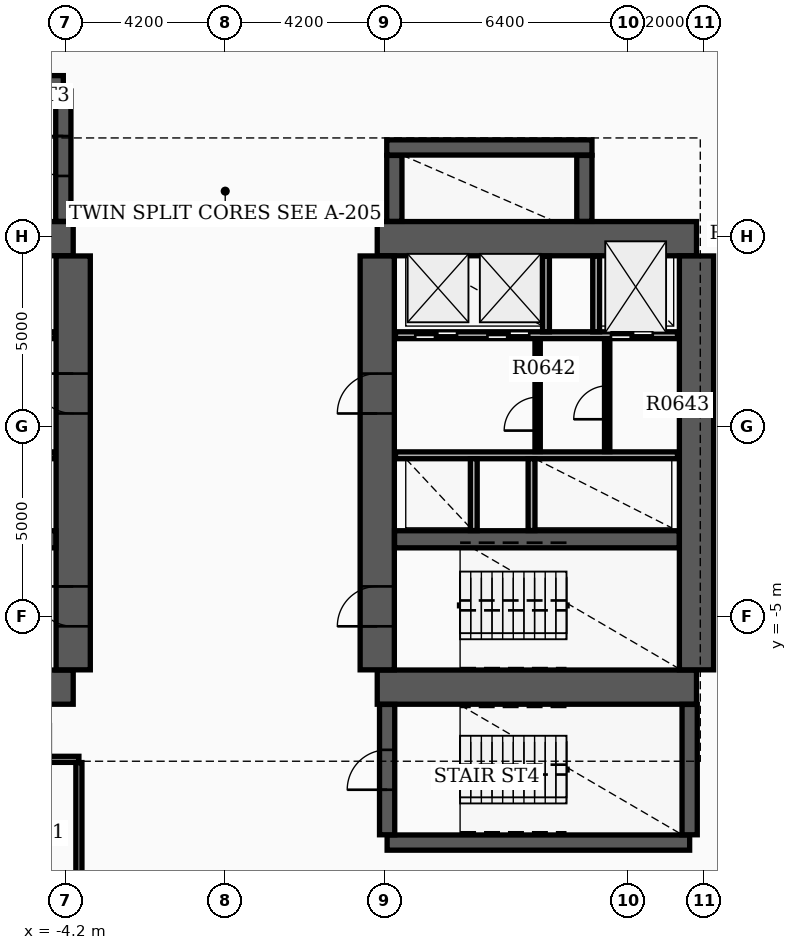
"""IFC4 building model, lengths in metres.
Left out: names, types, materials, properties, quantities, classifications, styles, units other than length and angle.
Written with IfcOpenShell. Run it as: python <this file> out.ifc"""

import sys

from ifc_helpers import new_model, si_unit, direction, frame, frame_2d, origin, place, context, subcontext, project, spatial, rectangle, extrude, element, fill, save


model = new_model("IFC4")
c1 = context("Model", 3, precision=1e-05, world=origin(), true_north=direction((0.0, 1.0)))
c2 = subcontext(c1, "Body", "Model", "MODEL_VIEW")
j1 = project(units=[si_unit("LENGTHUNIT", "METRE"), si_unit("PLANEANGLEUNIT", "RADIAN")], contexts=[c1])
p1 = place(None, origin())
s1 = spatial("IfcSite", under=j1, at=p1, CompositionType="ELEMENT")
p2 = place(p1, origin())
s2 = spatial("IfcBuilding", under=s1, at=p2, CompositionType="ELEMENT")
p3 = place(p2, frame((0.0, 0.0, 43.2)))
s3 = spatial("IfcBuildingStorey", under=s2, at=p3, CompositionType="ELEMENT", Elevation=43.2)
for number, where, z_axis, x_axis in (
    (1, (-12.4, -6.85, 0.0), (0.0, 0.0, 1.0), (1.0, 0.0, 0.0)),
    (2, (-12.4, 4.95, 0.0), (0.0, 0.0, 1.0), (1.0, 0.0, 0.0)),
):
    element("IfcWall", number, at=place(p3, frame(where, z_axis=z_axis, x_axis=x_axis)), inside=s3, PredefinedType="SHEAR", context=c2, shape_type="SweptSolid", body=[
        extrude(rectangle(XDim=8.4, YDim=0.9, at=frame_2d((4.2, 0.0))), origin(), (0.0, 0.0, 1.0), 3.65),
    ])
p4 = place(p3, frame((-4.0, -6.395, 0.0), z_axis=(0.0, 0.0, 1.0), x_axis=(0.0, 1.0, 0.0)))
e3 = element("IfcWall", 3, at=p4, inside=s3, PredefinedType="SHEAR", context=c2, shape_type="SweptSolid", body=[
    extrude(rectangle(XDim=10.89, YDim=0.9, at=frame_2d((5.445, 0.0))), origin(), (0.0, 0.0, 1.0), 3.65),
])
p5 = place(p4, frame((1.145, 0.0, 0.0)))
e4 = element("IfcOpeningElement", 4, at=p5, cuts=e3, PredefinedType="OPENING", context=c2, shape_type="SweptSolid", body=[
    extrude(rectangle(XDim=1.05, YDim=2.15, at=frame_2d((0.525, 1.075))), frame((0.0, 0.46, 0.0), z_axis=(0.0, -1.0, 0.0), x_axis=(1.0, 0.0, 0.0)), (0.0, 0.0, 1.0), 0.92),
])
p6 = place(p4, frame((6.745, 0.0, 0.0)))
e5 = element("IfcOpeningElement", 5, at=p6, cuts=e3, PredefinedType="OPENING", context=c2, shape_type="SweptSolid", body=[
    extrude(rectangle(XDim=1.05, YDim=2.15, at=frame_2d((0.525, 1.075))), frame((0.0, 0.46, 0.0), z_axis=(0.0, -1.0, 0.0), x_axis=(1.0, 0.0, 0.0)), (0.0, 0.0, 1.0), 0.92),
])
p7 = place(p3, frame((-11.945, -2.96, 0.0), z_axis=(0.0, 0.0, 1.0), x_axis=(1.0, 0.0, 0.0)))
e6 = element("IfcWall", 6, at=p7, inside=s3, PredefinedType="SHEAR", context=c2, shape_type="SweptSolid", body=[
    extrude(rectangle(XDim=7.49, YDim=0.45, at=frame_2d((3.745, 0.0))), origin(), (0.0, 0.0, 1.0), 3.65),
])
for number, where, z_axis, x_axis in (
    (7, (4.0, -6.85, 0.0), (0.0, 0.0, 1.0), (1.0, 0.0, 0.0)),
    (8, (4.0, 4.95, 0.0), (0.0, 0.0, 1.0), (1.0, 0.0, 0.0)),
):
    element("IfcWall", number, at=place(p3, frame(where, z_axis=z_axis, x_axis=x_axis)), inside=s3, PredefinedType="SHEAR", context=c2, shape_type="SweptSolid", body=[
        extrude(rectangle(XDim=8.4, YDim=0.9, at=frame_2d((4.2, 0.0))), origin(), (0.0, 0.0, 1.0), 3.65),
    ])
p8 = place(p3, frame((4.0, -6.395, 0.0), z_axis=(0.0, 0.0, 1.0), x_axis=(0.0, 1.0, 0.0)))
e9 = element("IfcWall", 9, at=p8, inside=s3, PredefinedType="SHEAR", context=c2, shape_type="SweptSolid", body=[
    extrude(rectangle(XDim=10.89, YDim=0.9, at=frame_2d((5.445, 0.0))), origin(), (0.0, 0.0, 1.0), 3.65),
])
p9 = place(p8, frame((1.145, 0.0, 0.0)))
e10 = element("IfcOpeningElement", 10, at=p9, cuts=e9, PredefinedType="OPENING", context=c2, shape_type="SweptSolid", body=[
    extrude(rectangle(XDim=1.05, YDim=2.15, at=frame_2d((0.525, 1.075))), frame((0.0, 0.46, 0.0), z_axis=(0.0, -1.0, 0.0), x_axis=(1.0, 0.0, 0.0)), (0.0, 0.0, 1.0), 0.92),
])
p10 = place(p8, frame((6.745, 0.0, 0.0)))
e11 = element("IfcOpeningElement", 11, at=p10, cuts=e9, PredefinedType="OPENING", context=c2, shape_type="SweptSolid", body=[
    extrude(rectangle(XDim=1.05, YDim=2.15, at=frame_2d((0.525, 1.075))), frame((0.0, 0.46, 0.0), z_axis=(0.0, -1.0, 0.0), x_axis=(1.0, 0.0, 0.0)), (0.0, 0.0, 1.0), 0.92),
])
p11 = place(p3, frame((12.4, -6.395, 0.0), z_axis=(0.0, 0.0, 1.0), x_axis=(0.0, 1.0, 0.0)))
e12 = element("IfcWall", 12, at=p11, inside=s3, PredefinedType="SHEAR", context=c2, shape_type="SweptSolid", body=[
    extrude(rectangle(XDim=10.89, YDim=0.9, at=frame_2d((5.445, 0.0))), origin(), (0.0, 0.0, 1.0), 3.65),
])
p12 = place(p3, frame((4.455, -2.96, 0.0), z_axis=(0.0, 0.0, 1.0), x_axis=(1.0, 0.0, 0.0)))
e13 = element("IfcWall", 13, at=p12, inside=s3, PredefinedType="SHEAR", context=c2, shape_type="SweptSolid", body=[
    extrude(rectangle(XDim=7.49, YDim=0.45, at=frame_2d((3.745, 0.0))), origin(), (0.0, 0.0, 1.0), 3.65),
])
p13 = place(p3, frame((-12.22, 9.04, 0.0), z_axis=(0.0, 0.0, 1.0), x_axis=(1.0, 0.0, 0.0)))
e14 = element("IfcWall", 14, at=p13, inside=s3, PredefinedType="SHEAR", context=c2, shape_type="SweptSolid", body=[
    extrude(rectangle(XDim=7.96, YDim=0.4, at=frame_2d((3.98, 0.0))), origin(), (0.0, 0.0, 1.0), 3.65),
])
p14 = place(p3, frame((-4.26, 5.405, 0.0), z_axis=(0.0, 0.0, 1.0), x_axis=(0.0, 1.0, 0.0)))
e15 = element("IfcWall", 15, at=p14, inside=s3, PredefinedType="SHEAR", context=c2, shape_type="SweptSolid", body=[
    extrude(rectangle(XDim=3.43, YDim=0.4, at=frame_2d((1.715, 0.0))), origin(), (0.0, 0.0, 1.0), 3.65),
])
p15 = place(p14, frame((1.195, 0.0, 0.0)))
e16 = element("IfcOpeningElement", 16, at=p15, cuts=e15, PredefinedType="OPENING", context=c2, shape_type="SweptSolid", body=[
    extrude(rectangle(XDim=1.05, YDim=2.15, at=frame_2d((0.525, 1.075))), frame((0.0, 0.21, 0.0), z_axis=(0.0, -1.0, 0.0), x_axis=(1.0, 0.0, 0.0)), (0.0, 0.0, 1.0), 0.42),
])
p16 = place(p3, frame((4.26, -10.94, 0.0), z_axis=(0.0, 0.0, 1.0), x_axis=(1.0, 0.0, 0.0)))
e17 = element("IfcWall", 17, at=p16, inside=s3, PredefinedType="SHEAR", context=c2, shape_type="SweptSolid", body=[
    extrude(rectangle(XDim=7.96, YDim=0.4, at=frame_2d((3.98, 0.0))), origin(), (0.0, 0.0, 1.0), 3.65),
])
p17 = place(p3, frame((4.26, -10.735, 0.0), z_axis=(0.0, 0.0, 1.0), x_axis=(0.0, 1.0, 0.0)))
e18 = element("IfcWall", 18, at=p17, inside=s3, PredefinedType="SHEAR", context=c2, shape_type="SweptSolid", body=[
    extrude(rectangle(XDim=3.43, YDim=0.4, at=frame_2d((1.715, 0.0))), origin(), (0.0, 0.0, 1.0), 3.65),
])
p18 = place(p17, frame((1.185, 0.0, 0.0)))
e19 = element("IfcOpeningElement", 19, at=p18, cuts=e18, PredefinedType="OPENING", context=c2, shape_type="SweptSolid", body=[
    extrude(rectangle(XDim=1.05, YDim=2.15, at=frame_2d((0.525, 1.075))), frame((0.0, 0.21, 0.0), z_axis=(0.0, -1.0, 0.0), x_axis=(1.0, 0.0, 0.0)), (0.0, 0.0, 1.0), 0.42),
])
p19 = place(p3, frame((12.22, -10.735, 0.0), z_axis=(0.0, 0.0, 1.0), x_axis=(0.0, 1.0, 0.0)))
e20 = element("IfcWall", 20, at=p19, inside=s3, PredefinedType="SHEAR", context=c2, shape_type="SweptSolid", body=[
    extrude(rectangle(XDim=3.43, YDim=0.4, at=frame_2d((1.715, 0.0))), origin(), (0.0, 0.0, 1.0), 3.65),
])
p20 = place(p3, frame((4.45, 5.405, 0.0), z_axis=(0.0, 0.0, 1.0), x_axis=(0.0, 1.0, 0.0)))
e21 = element("IfcWall", 21, at=p20, inside=s3, PredefinedType="SHEAR", context=c2, shape_type="SweptSolid", body=[
    extrude(rectangle(XDim=1.735, YDim=0.4, at=frame_2d((0.867, 0.0))), origin(), (0.0, 0.0, 1.0), 3.65),
])
p21 = place(p3, frame((4.25, 7.35, 0.0), z_axis=(0.0, 0.0, 1.0), x_axis=(1.0, 0.0, 0.0)))
e22 = element("IfcWall", 22, at=p21, inside=s3, PredefinedType="SHEAR", context=c2, shape_type="SweptSolid", body=[
    extrude(rectangle(XDim=5.4, YDim=0.4, at=frame_2d((2.7, 0.0))), origin(), (0.0, 0.0, 1.0), 3.65),
])
p22 = place(p3, frame((9.45, 5.405, 0.0), z_axis=(0.0, 0.0, 1.0), x_axis=(0.0, 1.0, 0.0)))
e23 = element("IfcWall", 23, at=p22, inside=s3, PredefinedType="SHEAR", context=c2, shape_type="SweptSolid", body=[
    extrude(rectangle(XDim=1.735, YDim=0.4, at=frame_2d((0.867, 0.0))), origin(), (0.0, 0.0, 1.0), 3.65),
])
p23 = place(p3, frame((-11.9, 2.41, 0.0), z_axis=(0.0, 0.0, 1.0), x_axis=(1.0, 0.0, 0.0)))
e24 = element("IfcWall", 24, at=p23, inside=s3, PredefinedType="SOLIDWALL", context=c2, shape_type="SweptSolid", body=[
    extrude(rectangle(XDim=7.42, YDim=0.18, at=frame_2d((3.71, 0.0))), origin(), (0.0, 0.0, 1.0), 2.85),
])
p24 = place(p23, frame((0.55, 0.0, 0.0)))
e25 = element("IfcOpeningElement", 25, at=p24, cuts=e24, PredefinedType="OPENING", context=c2, shape_type="SweptSolid", body=[
    extrude(rectangle(XDim=1.1, YDim=2.15, at=frame_2d((0.55, 1.075))), frame((0.0, 0.1, 0.0), z_axis=(0.0, -1.0, 0.0), x_axis=(1.0, 0.0, 0.0)), (0.0, 0.0, 1.0), 0.2),
])
p25 = place(p23, frame((3.85, 0.0, 0.0)))
e26 = element("IfcOpeningElement", 26, at=p25, cuts=e24, PredefinedType="OPENING", context=c2, shape_type="SweptSolid", body=[
    extrude(rectangle(XDim=1.1, YDim=2.15, at=frame_2d((0.55, 1.075))), frame((0.0, 0.1, 0.0), z_axis=(0.0, -1.0, 0.0), x_axis=(1.0, 0.0, 0.0)), (0.0, 0.0, 1.0), 0.2),
])
p26 = place(p23, frame((5.75, 0.0, 0.0)))
e27 = element("IfcOpeningElement", 27, at=p26, cuts=e24, PredefinedType="OPENING", context=c2, shape_type="SweptSolid", body=[
    extrude(rectangle(XDim=1.1, YDim=2.15, at=frame_2d((0.55, 1.075))), frame((0.0, 0.1, 0.0), z_axis=(0.0, -1.0, 0.0), x_axis=(1.0, 0.0, 0.0)), (0.0, 0.0, 1.0), 0.2),
])
p27 = place(p3, frame((4.48, 2.41, 0.0), z_axis=(0.0, 0.0, 1.0), x_axis=(1.0, 0.0, 0.0)))
e28 = element("IfcWall", 28, at=p27, inside=s3, PredefinedType="SOLIDWALL", context=c2, shape_type="SweptSolid", body=[
    extrude(rectangle(XDim=7.42, YDim=0.18, at=frame_2d((3.71, 0.0))), origin(), (0.0, 0.0, 1.0), 2.85),
])
p28 = place(p27, frame((5.67, 0.0, 0.0)))
e29 = element("IfcOpeningElement", 29, at=p28, cuts=e28, PredefinedType="OPENING", context=c2, shape_type="SweptSolid", body=[
    extrude(rectangle(XDim=1.1, YDim=2.15, at=frame_2d((0.55, 1.075))), frame((0.0, 0.1, 0.0), z_axis=(0.0, -1.0, 0.0), x_axis=(1.0, 0.0, 0.0)), (0.0, 0.0, 1.0), 0.2),
])
p29 = place(p27, frame((0.52, 0.0, 0.0)))
e30 = element("IfcOpeningElement", 30, at=p29, cuts=e28, PredefinedType="OPENING", context=c2, shape_type="SweptSolid", body=[
    extrude(rectangle(XDim=1.1, YDim=2.15, at=frame_2d((0.55, 1.075))), frame((0.0, 0.1, 0.0), z_axis=(0.0, -1.0, 0.0), x_axis=(1.0, 0.0, 0.0)), (0.0, 0.0, 1.0), 0.2),
])
p30 = place(p27, frame((2.42, 0.0, 0.0)))
e31 = element("IfcOpeningElement", 31, at=p30, cuts=e28, PredefinedType="OPENING", context=c2, shape_type="SweptSolid", body=[
    extrude(rectangle(XDim=1.1, YDim=2.15, at=frame_2d((0.55, 1.075))), frame((0.0, 0.1, 0.0), z_axis=(0.0, -1.0, 0.0), x_axis=(1.0, 0.0, 0.0)), (0.0, 0.0, 1.0), 0.2),
])
for number, where, z_axis, x_axis in (
    (32, (-11.9, -0.75, 0.0), (0.0, 0.0, 1.0), (1.0, 0.0, 0.0)),
    (33, (4.48, -0.75, 0.0), (0.0, 0.0, 1.0), (1.0, 0.0, 0.0)),
):
    element("IfcWall", number, at=place(p3, frame(where, z_axis=z_axis, x_axis=x_axis)), inside=s3, PredefinedType="SOLIDWALL", context=c2, shape_type="SweptSolid", body=[
        extrude(rectangle(XDim=7.42, YDim=0.18, at=frame_2d((3.71, 0.0))), origin(), (0.0, 0.0, 1.0), 2.85),
    ])
for number, where, z_axis, x_axis in (
    (34, (8.44, 2.5, 0.0), (0.0, 0.0, 1.0), (0.0, 1.0, 0.0)),
    (35, (9.76, 2.5, 0.0), (0.0, 0.0, 1.0), (0.0, 1.0, 0.0)),
):
    element("IfcWall", number, at=place(p3, frame(where, z_axis=z_axis, x_axis=x_axis)), inside=s3, PredefinedType="SOLIDWALL", context=c2, shape_type="SweptSolid", body=[
        extrude(rectangle(XDim=1.99, YDim=0.18, at=frame_2d((0.995, 0.0))), origin(), (0.0, 0.0, 1.0), 2.85),
    ])
for number, where, z_axis, x_axis in (
    (36, (6.54, -2.73, 0.0), (0.0, 0.0, 1.0), (0.0, 1.0, 0.0)),
    (37, (8.06, -2.73, 0.0), (0.0, 0.0, 1.0), (0.0, 1.0, 0.0)),
):
    element("IfcWall", number, at=place(p3, frame(where, z_axis=z_axis, x_axis=x_axis)), inside=s3, PredefinedType="SOLIDWALL", context=c2, shape_type="SweptSolid", body=[
        extrude(rectangle(XDim=1.89, YDim=0.18, at=frame_2d((0.945, 0.0))), origin(), (0.0, 0.0, 1.0), 2.85),
    ])
p31 = place(p3, frame((8.22, -0.65, 0.0), z_axis=(0.0, 0.0, 1.0), x_axis=(0.0, 1.0, 0.0)))
e38 = element("IfcWall", 38, at=p31, inside=s3, PredefinedType="SOLIDWALL", context=c2, shape_type="SweptSolid", body=[
    extrude(rectangle(XDim=2.96, YDim=0.14, at=frame_2d((1.48, 0.0))), origin(), (0.0, 0.0, 1.0), 2.85),
])
p32 = place(p31, frame((0.55, 0.0, 0.0)))
e39 = element("IfcOpeningElement", 39, at=p32, cuts=e38, PredefinedType="OPENING", context=c2, shape_type="SweptSolid", body=[
    extrude(rectangle(XDim=0.88, YDim=2.1, at=frame_2d((0.44, 1.05))), frame((0.0, 0.08, 0.0), z_axis=(0.0, -1.0, 0.0), x_axis=(1.0, 0.0, 0.0)), (0.0, 0.0, 1.0), 0.16),
])
p33 = place(p3, frame((10.05, -0.652, 0.0), z_axis=(0.0, 0.0, 1.0), x_axis=(0.0, 1.0, 0.0)))
e40 = element("IfcWall", 40, at=p33, inside=s3, PredefinedType="PARTITIONING", context=c2, shape_type="SweptSolid", body=[
    extrude(rectangle(XDim=2.962, YDim=0.14, at=frame_2d((1.481, 0.0))), origin(), (0.0, 0.0, 1.0), 2.85),
])
p34 = place(p33, frame((0.85, 0.0, 0.0)))
e41 = element("IfcOpeningElement", 41, at=p34, cuts=e40, PredefinedType="OPENING", context=c2, shape_type="SweptSolid", body=[
    extrude(rectangle(XDim=0.88, YDim=2.1, at=frame_2d((0.44, 1.05))), frame((0.0, 0.08, 0.0), z_axis=(0.0, -1.0, 0.0), x_axis=(1.0, 0.0, 0.0)), (0.0, 0.0, 1.0), 0.16),
])
p35 = place(p3, frame((-6.29, -8.75, 0.0), z_axis=(0.0, 0.0, 1.0), x_axis=(1.0, 0.0, 0.0)))
e42 = element("IfcWall", 42, at=p35, inside=s3, PredefinedType="PARTITIONING", context=c2, shape_type="SweptSolid", body=[
    extrude(rectangle(XDim=2.44, YDim=0.16, at=frame_2d((1.22, 0.0))), origin(), (0.0, 0.0, 1.0), 2.85),
])
p36 = place(p35, frame((0.74, 0.0, 0.0)))
e43 = element("IfcOpeningElement", 43, at=p36, cuts=e42, PredefinedType="OPENING", context=c2, shape_type="SweptSolid", body=[
    extrude(rectangle(XDim=0.96, YDim=2.15, at=frame_2d((0.48, 1.075))), frame((0.0, 0.09, 0.0), z_axis=(0.0, -1.0, 0.0), x_axis=(1.0, 0.0, 0.0)), (0.0, 0.0, 1.0), 0.18),
])
p37 = place(p3, frame((-3.85, -13.065, 0.0), z_axis=(0.0, 0.0, 1.0), x_axis=(0.0, 1.0, 0.0)))
e44 = element("IfcWall", 44, at=p37, inside=s3, PredefinedType="PARTITIONING", context=c2, shape_type="SweptSolid", body=[
    extrude(rectangle(XDim=4.23, YDim=0.16, at=frame_2d((2.115, 0.0))), origin(), (0.0, 0.0, 1.0), 2.85),
])
p38 = place(p5, origin())
e45 = element("IfcDoor", 45, at=p38, inside=s3, OperationType="SINGLE_SWING_RIGHT", PredefinedType="DOOR", context=c2, shape_type="SweptSolid", body=[
    extrude(rectangle(XDim=1.05, YDim=2.15, at=frame_2d((0.525, 1.075))), frame((0.0, 0.025, 0.0), z_axis=(0.0, -1.0, 0.0), x_axis=(1.0, 0.0, 0.0)), (0.0, 0.0, 1.0), 0.05),
])
fill(e4, e45)
p39 = place(p9, origin())
e46 = element("IfcDoor", 46, at=p39, inside=s3, OperationType="SINGLE_SWING_LEFT", PredefinedType="DOOR", context=c2, shape_type="SweptSolid", body=[
    extrude(rectangle(XDim=1.05, YDim=2.15, at=frame_2d((0.525, 1.075))), frame((0.0, 0.025, 0.0), z_axis=(0.0, -1.0, 0.0), x_axis=(1.0, 0.0, 0.0)), (0.0, 0.0, 1.0), 0.05),
])
fill(e10, e46)
p40 = place(p6, origin())
e47 = element("IfcDoor", 47, at=p40, inside=s3, OperationType="SINGLE_SWING_RIGHT", PredefinedType="DOOR", context=c2, shape_type="SweptSolid", body=[
    extrude(rectangle(XDim=1.05, YDim=2.15, at=frame_2d((0.525, 1.075))), frame((0.0, 0.025, 0.0), z_axis=(0.0, -1.0, 0.0), x_axis=(1.0, 0.0, 0.0)), (0.0, 0.0, 1.0), 0.05),
])
fill(e5, e47)
p41 = place(p10, origin())
e48 = element("IfcDoor", 48, at=p41, inside=s3, OperationType="SINGLE_SWING_LEFT", PredefinedType="DOOR", context=c2, shape_type="SweptSolid", body=[
    extrude(rectangle(XDim=1.05, YDim=2.15, at=frame_2d((0.525, 1.075))), frame((0.0, 0.025, 0.0), z_axis=(0.0, -1.0, 0.0), x_axis=(1.0, 0.0, 0.0)), (0.0, 0.0, 1.0), 0.05),
])
fill(e11, e48)
p42 = place(p15, origin())
e49 = element("IfcDoor", 49, at=p42, inside=s3, OperationType="SINGLE_SWING_RIGHT", PredefinedType="DOOR", context=c2, shape_type="SweptSolid", body=[
    extrude(rectangle(XDim=1.05, YDim=2.15, at=frame_2d((0.525, 1.075))), frame((0.0, 0.025, 0.0), z_axis=(0.0, -1.0, 0.0), x_axis=(1.0, 0.0, 0.0)), (0.0, 0.0, 1.0), 0.05),
])
fill(e16, e49)
p43 = place(p18, origin())
e50 = element("IfcDoor", 50, at=p43, inside=s3, OperationType="SINGLE_SWING_LEFT", PredefinedType="DOOR", context=c2, shape_type="SweptSolid", body=[
    extrude(rectangle(XDim=1.05, YDim=2.15, at=frame_2d((0.525, 1.075))), frame((0.0, 0.025, 0.0), z_axis=(0.0, -1.0, 0.0), x_axis=(1.0, 0.0, 0.0)), (0.0, 0.0, 1.0), 0.05),
])
fill(e19, e50)
p44 = place(p28, origin())
e51 = element("IfcDoor", 51, at=p44, inside=s3, OperationType="DOUBLE_DOOR_SLIDING", PredefinedType="DOOR", context=c2, shape_type="SweptSolid", body=[
    extrude(rectangle(XDim=1.1, YDim=2.15, at=frame_2d((0.55, 1.075))), frame((0.0, 0.025, 0.0), z_axis=(0.0, -1.0, 0.0), x_axis=(1.0, 0.0, 0.0)), (0.0, 0.0, 1.0), 0.05),
])
fill(e29, e51)
p45 = place(p29, origin())
e52 = element("IfcDoor", 52, at=p45, inside=s3, OperationType="DOUBLE_DOOR_SLIDING", PredefinedType="DOOR", context=c2, shape_type="SweptSolid", body=[
    extrude(rectangle(XDim=1.1, YDim=2.15, at=frame_2d((0.55, 1.075))), frame((0.0, 0.025, 0.0), z_axis=(0.0, -1.0, 0.0), x_axis=(1.0, 0.0, 0.0)), (0.0, 0.0, 1.0), 0.05),
])
fill(e30, e52)
p46 = place(p30, origin())
e53 = element("IfcDoor", 53, at=p46, inside=s3, OperationType="DOUBLE_DOOR_SLIDING", PredefinedType="DOOR", context=c2, shape_type="SweptSolid", body=[
    extrude(rectangle(XDim=1.1, YDim=2.15, at=frame_2d((0.55, 1.075))), frame((0.0, 0.025, 0.0), z_axis=(0.0, -1.0, 0.0), x_axis=(1.0, 0.0, 0.0)), (0.0, 0.0, 1.0), 0.05),
])
fill(e31, e53)
p47 = place(p32, origin())
e54 = element("IfcDoor", 54, at=p47, inside=s3, OperationType="SINGLE_SWING_LEFT", PredefinedType="DOOR", context=c2, shape_type="SweptSolid", body=[
    extrude(rectangle(XDim=0.88, YDim=2.1, at=frame_2d((0.44, 1.05))), frame((0.0, 0.025, 0.0), z_axis=(0.0, -1.0, 0.0), x_axis=(1.0, 0.0, 0.0)), (0.0, 0.0, 1.0), 0.05),
])
fill(e39, e54)
p48 = place(p34, origin())
e55 = element("IfcDoor", 55, at=p48, inside=s3, OperationType="SINGLE_SWING_LEFT", PredefinedType="DOOR", context=c2, shape_type="SweptSolid", body=[
    extrude(rectangle(XDim=0.88, YDim=2.1, at=frame_2d((0.44, 1.05))), frame((0.0, 0.025, 0.0), z_axis=(0.0, -1.0, 0.0), x_axis=(1.0, 0.0, 0.0)), (0.0, 0.0, 1.0), 0.05),
])
fill(e41, e55)
save(model, sys.argv[1])
